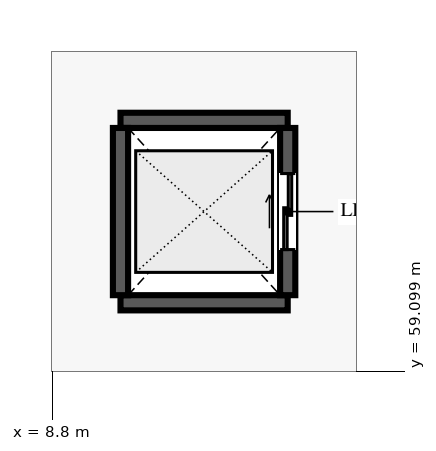
"""IFC4 building model, lengths in metres.
Left out: names, types, materials, properties, quantities, classifications, styles, units other than length and angle.
Written with IfcOpenShell. Run it as: python <this file> out.ifc"""

import sys

from ifc_helpers import new_model, si_unit, direction, frame, frame_2d, origin, place, context, subcontext, project, spatial, rectangle, extrude, element, fill, save


model = new_model("IFC4")
c1 = context("Model", 3, precision=1e-05, world=origin(), true_north=direction((0.0, 1.0)))
c2 = subcontext(c1, "Body", "Model", "MODEL_VIEW")
j1 = project(units=[si_unit("LENGTHUNIT", "METRE"), si_unit("PLANEANGLEUNIT", "RADIAN")], contexts=[c1])
p1 = place(None, origin())
s1 = spatial("IfcSite", under=j1, at=p1, CompositionType="ELEMENT")
p2 = place(p1, origin())
s2 = spatial("IfcBuilding", under=s1, at=p2, CompositionType="ELEMENT")
p3 = place(p2, frame((0.0, 0.0, 17.55)))
s3 = spatial("IfcBuildingStorey", under=s2, at=p3, CompositionType="ELEMENT", Elevation=17.55)
for number, where, z_axis, x_axis in (
    (1, (9.7, 60.0, 0.0), (0.0, 0.0, 1.0), (1.0, 0.0, 0.0)),
    (2, (9.7, 62.4, 0.0), (0.0, 0.0, 1.0), (1.0, 0.0, 0.0)),
    (3, (9.7, 60.1, 0.0), (0.0, 0.0, 1.0), (0.0, 1.0, 0.0)),
):
    element("IfcWall", number, at=place(p3, frame(where, z_axis=z_axis, x_axis=x_axis)), inside=s3, PredefinedType="SHEAR", context=c2, shape_type="SweptSolid", body=[
        extrude(rectangle(XDim=2.2, YDim=0.2, at=frame_2d((1.1, 0.0))), origin(), (0.0, 0.0, 1.0), 3.83),
    ])
p4 = place(p3, frame((11.9, 60.1, 0.0), z_axis=(0.0, 0.0, 1.0), x_axis=(0.0, 1.0, 0.0)))
e4 = element("IfcWall", 4, at=p4, inside=s3, PredefinedType="SHEAR", context=c2, shape_type="SweptSolid", body=[
    extrude(rectangle(XDim=2.2, YDim=0.2, at=frame_2d((1.1, 0.0))), origin(), (0.0, 0.0, 1.0), 3.83),
])
p5 = place(p4, frame((0.6, 0.0, 0.0)))
e5 = element("IfcOpeningElement", 5, at=p5, cuts=e4, PredefinedType="OPENING", context=c2, shape_type="SweptSolid", body=[
    extrude(rectangle(XDim=1.0, YDim=2.1, at=frame_2d((0.5, 1.05))), frame((0.0, 0.11, 0.0), z_axis=(0.0, -1.0, 0.0), x_axis=(1.0, 0.0, 0.0)), (0.0, 0.0, 1.0), 0.22),
])
p6 = place(p5, origin())
e6 = element("IfcDoor", 6, at=p6, inside=s3, OperationType="DOUBLE_DOOR_SLIDING", PredefinedType="DOOR", context=c2, shape_type="SweptSolid", body=[
    extrude(rectangle(XDim=1.0, YDim=2.1, at=frame_2d((0.5, 1.05))), frame((0.0, 0.025, 0.0), z_axis=(0.0, -1.0, 0.0), x_axis=(1.0, 0.0, 0.0)), (0.0, 0.0, 1.0), 0.05),
])
fill(e5, e6)
save(model, sys.argv[1])
